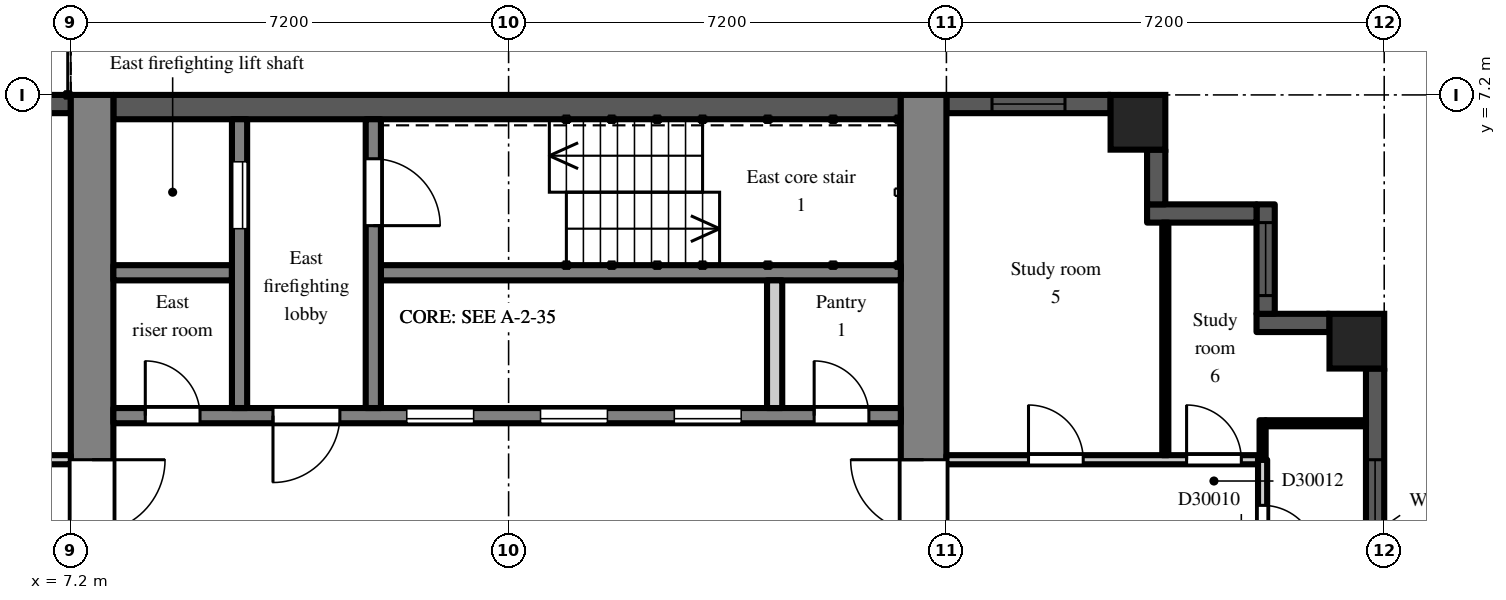
"""IFC4 building model, lengths in metres.
Left out: names, types, materials, properties, quantities, classifications, styles, units other than length and angle.
Written with IfcOpenShell. Run it as: python <this file> out.ifc"""

import sys

from ifc_helpers import new_model, si_unit, direction, frame, frame_2d, origin, origin_2d, place, context, subcontext, project, spatial, rectangle, extrude, element, fill, save


model = new_model("IFC4")
c1 = context("Model", 3, precision=1e-05, world=origin(), true_north=direction((0.0, 1.0)))
c2 = subcontext(c1, "Body", "Model", "MODEL_VIEW")
j1 = project(units=[si_unit("LENGTHUNIT", "METRE"), si_unit("PLANEANGLEUNIT", "RADIAN")], contexts=[c1])
p1 = place(None, origin())
s1 = spatial("IfcSite", under=j1, at=p1, CompositionType="ELEMENT")
p2 = place(p1, origin())
s2 = spatial("IfcBuilding", under=s1, at=p2, CompositionType="ELEMENT")
p3 = place(p2, frame((0.0, 0.0, 207.9)))
s3 = spatial("IfcBuildingStorey", under=s2, at=p3, CompositionType="ELEMENT", Elevation=207.9)
for number, where, z_axis, x_axis in (
    (1, (24.75, 6.75, 0.0), (0.0, 0.0, 1.0), (1.0, 0.0, 0.0)),
    (2, (28.35, 3.15, 0.0), (0.0, 0.0, 1.0), (1.0, 0.0, 0.0)),
):
    element("IfcColumn", number, at=place(p3, frame(where, z_axis=z_axis, x_axis=x_axis)), inside=s3, PredefinedType="COLUMN", context=c2, shape_type="SweptSolid", body=[
        extrude(rectangle(XDim=0.9, YDim=0.9, at=origin_2d()), origin(), (0.0, 0.0, 1.0), 3.0),
    ])
p4 = place(p3, frame((28.65, -2.7, 0.0), z_axis=(0.0, 0.0, 1.0), x_axis=(0.0, 1.0, 0.0)))
e3 = element("IfcWall", 3, at=p4, inside=s3, PredefinedType="SOLIDWALL", context=c2, shape_type="SweptSolid", body=[
    extrude(rectangle(XDim=5.4, YDim=0.3, at=frame_2d((2.7, 0.0))), origin(), (0.0, 0.0, 1.0), 2.3),
])
p5 = place(p4, frame((1.5, 0.0, 0.2)))
e4 = element("IfcOpeningElement", 4, at=p5, cuts=e3, PredefinedType="OPENING", context=c2, shape_type="SweptSolid", body=[
    extrude(rectangle(XDim=2.4, YDim=1.85, at=frame_2d((1.2, 0.925))), frame((0.0, 0.16, 0.0), z_axis=(0.0, -1.0, 0.0), x_axis=(1.0, 0.0, 0.0)), (0.0, 0.0, 1.0), 0.32),
])
p6 = place(p3, frame((27.9, 3.45, 0.0), z_axis=(0.0, 0.0, 1.0), x_axis=(-1.0, 0.0, 0.0)))
e5 = element("IfcWall", 5, at=p6, inside=s3, PredefinedType="SOLIDWALL", context=c2, shape_type="SweptSolid", body=[
    extrude(rectangle(XDim=1.2, YDim=0.3, at=frame_2d((0.6, 0.0))), origin(), (0.0, 0.0, 1.0), 2.6),
])
p7 = place(p3, frame((26.85, 3.6, 0.0), z_axis=(0.0, 0.0, 1.0), x_axis=(0.0, 1.0, 0.0)))
e6 = element("IfcWall", 6, at=p7, inside=s3, PredefinedType="SOLIDWALL", context=c2, shape_type="SweptSolid", body=[
    extrude(rectangle(XDim=1.8, YDim=0.3, at=frame_2d((0.9, 0.0))), origin(), (0.0, 0.0, 1.0), 2.6),
])
p8 = place(p7, frame((0.3, 0.0, 0.2)))
e7 = element("IfcOpeningElement", 7, at=p8, cuts=e6, PredefinedType="OPENING", context=c2, shape_type="SweptSolid", body=[
    extrude(rectangle(XDim=1.2, YDim=1.85, at=frame_2d((0.6, 0.925))), frame((0.0, 0.16, 0.0), z_axis=(0.0, -1.0, 0.0), x_axis=(1.0, 0.0, 0.0)), (0.0, 0.0, 1.0), 0.32),
])
p9 = place(p3, frame((26.7, 5.25, 0.0), z_axis=(0.0, 0.0, 1.0), x_axis=(-1.0, 0.0, 0.0)))
e8 = element("IfcWall", 8, at=p9, inside=s3, PredefinedType="SOLIDWALL", context=c2, shape_type="SweptSolid", body=[
    extrude(rectangle(XDim=1.8, YDim=0.3, at=frame_2d((0.9, 0.0))), origin(), (0.0, 0.0, 1.0), 2.6),
])
p10 = place(p3, frame((25.05, 5.4, 0.0), z_axis=(0.0, 0.0, 1.0), x_axis=(0.0, 1.0, 0.0)))
e9 = element("IfcWall", 9, at=p10, inside=s3, PredefinedType="SOLIDWALL", context=c2, shape_type="SweptSolid", body=[
    extrude(rectangle(XDim=0.9, YDim=0.3, at=frame_2d((0.45, 0.0))), origin(), (0.0, 0.0, 1.0), 2.6),
])
p11 = place(p3, frame((24.3, 7.05, 0.0), z_axis=(0.0, 0.0, 1.0), x_axis=(-1.0, 0.0, 0.0)))
e10 = element("IfcWall", 10, at=p11, inside=s3, PredefinedType="SOLIDWALL", context=c2, shape_type="SweptSolid", body=[
    extrude(rectangle(XDim=2.7, YDim=0.3, at=frame_2d((1.35, 0.0))), origin(), (0.0, 0.0, 1.0), 2.3),
])
p12 = place(p11, frame((0.75, 0.0, 0.2)))
e11 = element("IfcOpeningElement", 11, at=p12, cuts=e10, PredefinedType="OPENING", context=c2, shape_type="SweptSolid", body=[
    extrude(rectangle(XDim=1.2, YDim=1.85, at=frame_2d((0.6, 0.925))), frame((0.0, 0.16, 0.0), z_axis=(0.0, -1.0, 0.0), x_axis=(1.0, 0.0, 0.0)), (0.0, 0.0, 1.0), 0.32),
])
p13 = place(p3, frame((7.2, 7.05, 0.0), z_axis=(0.0, 0.0, 1.0), x_axis=(-1.0, 0.0, 0.0)))
e12 = element("IfcWall", 12, at=p13, inside=s3, PredefinedType="SOLIDWALL", context=c2, shape_type="SweptSolid", body=[
    extrude(rectangle(XDim=3.0, YDim=0.3, at=frame_2d((1.5, 0.0))), origin(), (0.0, 0.0, 1.0), 2.3),
])
p14 = place(p3, frame((7.55, -7.2, 0.0), z_axis=(0.0, 0.0, 1.0), x_axis=(0.0, 1.0, 0.0)))
e13 = element("IfcWall", 13, at=p14, inside=s3, PredefinedType="SHEAR", context=c2, shape_type="SweptSolid", body=[
    extrude(rectangle(XDim=14.4, YDim=0.7, at=frame_2d((7.2, 0.0))), origin(), (0.0, 0.0, 1.0), 2.6),
])
p15 = place(p14, frame((6.0, 0.0, 0.0)))
e14 = element("IfcOpeningElement", 14, at=p15, cuts=e13, PredefinedType="OPENING", context=c2, shape_type="SweptSolid", body=[
    extrude(rectangle(XDim=2.4, YDim=2.2, at=frame_2d((1.2, 1.1))), frame((0.0, 0.36, 0.0), z_axis=(0.0, -1.0, 0.0), x_axis=(1.0, 0.0, 0.0)), (0.0, 0.0, 1.0), 0.72),
])
p16 = place(p3, frame((21.225, -7.2, 0.0), z_axis=(0.0, 0.0, 1.0), x_axis=(0.0, 1.0, 0.0)))
e15 = element("IfcWall", 15, at=p16, inside=s3, PredefinedType="SHEAR", context=c2, shape_type="SweptSolid", body=[
    extrude(rectangle(XDim=14.4, YDim=0.75, at=frame_2d((7.2, 0.0))), origin(), (0.0, 0.0, 1.0), 2.6),
])
p17 = place(p16, frame((6.0, 0.0, 0.0)))
e16 = element("IfcOpeningElement", 16, at=p17, cuts=e15, PredefinedType="OPENING", context=c2, shape_type="SweptSolid", body=[
    extrude(rectangle(XDim=2.4, YDim=2.2, at=frame_2d((1.2, 1.1))), frame((0.0, 0.385, 0.0), z_axis=(0.0, -1.0, 0.0), x_axis=(1.0, 0.0, 0.0)), (0.0, 0.0, 1.0), 0.77),
])
p18 = place(p3, frame((7.9, 7.0, 0.0), z_axis=(0.0, 0.0, 1.0), x_axis=(1.0, 0.0, 0.0)))
e17 = element("IfcWall", 17, at=p18, inside=s3, PredefinedType="SHEAR", context=c2, shape_type="SweptSolid", body=[
    extrude(rectangle(XDim=12.95, YDim=0.4, at=frame_2d((6.475, 0.0))), origin(), (0.0, 0.0, 1.0), 2.6),
])
p19 = place(p3, frame((7.9, 1.925, 0.0), z_axis=(0.0, 0.0, 1.0), x_axis=(1.0, 0.0, 0.0)))
e18 = element("IfcWall", 18, at=p19, inside=s3, PredefinedType="SHEAR", context=c2, shape_type="SweptSolid", body=[
    extrude(rectangle(XDim=12.95, YDim=0.25, at=frame_2d((6.475, 0.0))), origin(), (0.0, 0.0, 1.0), 2.6),
])
p20 = place(p19, frame((4.825, 0.0, 0.0)))
e19 = element("IfcOpeningElement", 19, at=p20, cuts=e18, PredefinedType="OPENING", context=c2, shape_type="SweptSolid", body=[
    extrude(rectangle(XDim=1.1, YDim=2.1, at=frame_2d((0.55, 1.05))), frame((0.0, 0.135, 0.0), z_axis=(0.0, -1.0, 0.0), x_axis=(1.0, 0.0, 0.0)), (0.0, 0.0, 1.0), 0.27),
])
p21 = place(p19, frame((7.025, 0.0, 0.0)))
e20 = element("IfcOpeningElement", 20, at=p21, cuts=e18, PredefinedType="OPENING", context=c2, shape_type="SweptSolid", body=[
    extrude(rectangle(XDim=1.1, YDim=2.1, at=frame_2d((0.55, 1.05))), frame((0.0, 0.135, 0.0), z_axis=(0.0, -1.0, 0.0), x_axis=(1.0, 0.0, 0.0)), (0.0, 0.0, 1.0), 0.27),
])
p22 = place(p19, frame((9.225, 0.0, 0.0)))
e21 = element("IfcOpeningElement", 21, at=p22, cuts=e18, PredefinedType="OPENING", context=c2, shape_type="SweptSolid", body=[
    extrude(rectangle(XDim=1.1, YDim=2.1, at=frame_2d((0.55, 1.05))), frame((0.0, 0.135, 0.0), z_axis=(0.0, -1.0, 0.0), x_axis=(1.0, 0.0, 0.0)), (0.0, 0.0, 1.0), 0.27),
])
p23 = place(p19, frame((0.525, 0.0, 0.0)))
e22 = element("IfcOpeningElement", 22, at=p23, cuts=e18, PredefinedType="OPENING", context=c2, shape_type="SweptSolid", body=[
    extrude(rectangle(XDim=0.9, YDim=2.1, at=frame_2d((0.45, 1.05))), frame((0.0, 0.135, 0.0), z_axis=(0.0, -1.0, 0.0), x_axis=(1.0, 0.0, 0.0)), (0.0, 0.0, 1.0), 0.27),
])
p24 = place(p19, frame((2.625, 0.0, 0.0)))
e23 = element("IfcOpeningElement", 23, at=p24, cuts=e18, PredefinedType="OPENING", context=c2, shape_type="SweptSolid", body=[
    extrude(rectangle(XDim=1.1, YDim=2.1, at=frame_2d((0.55, 1.05))), frame((0.0, 0.135, 0.0), z_axis=(0.0, -1.0, 0.0), x_axis=(1.0, 0.0, 0.0)), (0.0, 0.0, 1.0), 0.27),
])
p25 = place(p19, frame((11.525, 0.0, 0.0)))
e24 = element("IfcOpeningElement", 24, at=p25, cuts=e18, PredefinedType="OPENING", context=c2, shape_type="SweptSolid", body=[
    extrude(rectangle(XDim=0.9, YDim=2.1, at=frame_2d((0.45, 1.05))), frame((0.0, 0.135, 0.0), z_axis=(0.0, -1.0, 0.0), x_axis=(1.0, 0.0, 0.0)), (0.0, 0.0, 1.0), 0.27),
])
p26 = place(p3, frame((7.9, 4.275, 0.0), z_axis=(0.0, 0.0, 1.0), x_axis=(1.0, 0.0, 0.0)))
e25 = element("IfcWall", 25, at=p26, inside=s3, PredefinedType="SHEAR", context=c2, shape_type="SweptSolid", body=[
    extrude(rectangle(XDim=1.95, YDim=0.25, at=frame_2d((0.975, 0.0))), origin(), (0.0, 0.0, 1.0), 2.6),
])
p27 = place(p3, frame((12.3, 4.275, 0.0), z_axis=(0.0, 0.0, 1.0), x_axis=(1.0, 0.0, 0.0)))
e26 = element("IfcWall", 26, at=p27, inside=s3, PredefinedType="SHEAR", context=c2, shape_type="SweptSolid", body=[
    extrude(rectangle(XDim=8.55, YDim=0.25, at=frame_2d((4.275, 0.0))), origin(), (0.0, 0.0, 1.0), 2.6),
])
p28 = place(p3, frame((9.975, 2.05, 0.0), z_axis=(0.0, 0.0, 1.0), x_axis=(0.0, 1.0, 0.0)))
e27 = element("IfcWall", 27, at=p28, inside=s3, PredefinedType="SHEAR", context=c2, shape_type="SweptSolid", body=[
    extrude(rectangle(XDim=4.75, YDim=0.25, at=frame_2d((2.375, 0.0))), origin(), (0.0, 0.0, 1.0), 2.6),
])
p29 = place(p28, frame((2.95, 0.0, 0.0)))
e28 = element("IfcOpeningElement", 28, at=p29, cuts=e27, PredefinedType="OPENING", context=c2, shape_type="SweptSolid", body=[
    extrude(rectangle(XDim=1.1, YDim=2.1, at=frame_2d((0.55, 1.05))), frame((0.0, 0.135, 0.0), z_axis=(0.0, -1.0, 0.0), x_axis=(1.0, 0.0, 0.0)), (0.0, 0.0, 1.0), 0.27),
])
p30 = place(p3, frame((12.175, 2.05, 0.0), z_axis=(0.0, 0.0, 1.0), x_axis=(0.0, 1.0, 0.0)))
e29 = element("IfcWall", 29, at=p30, inside=s3, PredefinedType="SHEAR", context=c2, shape_type="SweptSolid", body=[
    extrude(rectangle(XDim=4.75, YDim=0.25, at=frame_2d((2.375, 0.0))), origin(), (0.0, 0.0, 1.0), 2.6),
])
p31 = place(p30, frame((3.0, 0.0, 0.0)))
e30 = element("IfcOpeningElement", 30, at=p31, cuts=e29, PredefinedType="OPENING", context=c2, shape_type="SweptSolid", body=[
    extrude(rectangle(XDim=1.1, YDim=2.1, at=frame_2d((0.55, 1.05))), frame((0.0, 0.135, 0.0), z_axis=(0.0, -1.0, 0.0), x_axis=(1.0, 0.0, 0.0)), (0.0, 0.0, 1.0), 0.27),
])
p32 = place(p3, frame((18.775, 2.05, 0.0), z_axis=(0.0, 0.0, 1.0), x_axis=(0.0, 1.0, 0.0)))
e31 = element("IfcWall", 31, at=p32, inside=s3, PredefinedType="PARTITIONING", context=c2, shape_type="SweptSolid", body=[
    extrude(rectangle(XDim=2.1, YDim=0.25, at=frame_2d((1.05, 0.0))), origin(), (0.0, 0.0, 1.0), 2.6),
])
p33 = place(p3, frame((1.275, 1.2, 0.0), z_axis=(0.0, 0.0, 1.0), x_axis=(1.0, 0.0, 0.0)))
e32 = element("IfcWall", 32, at=p33, inside=s3, PredefinedType="PARTITIONING", context=c2, shape_type="SweptSolid", body=[
    extrude(rectangle(XDim=5.925, YDim=0.15, at=frame_2d((2.962, 0.0))), origin(), (0.0, 0.0, 1.0), 2.6),
])
p34 = place(p33, frame((3.475, 0.0, 0.0)))
e33 = element("IfcOpeningElement", 33, at=p34, cuts=e32, PredefinedType="OPENING", context=c2, shape_type="SweptSolid", body=[
    extrude(rectangle(XDim=0.9, YDim=2.1, at=frame_2d((0.45, 1.05))), frame((0.0, 0.085, 0.0), z_axis=(0.0, -1.0, 0.0), x_axis=(1.0, 0.0, 0.0)), (0.0, 0.0, 1.0), 0.17),
])
p35 = place(p3, frame((21.6, 1.2, 0.0), z_axis=(0.0, 0.0, 1.0), x_axis=(1.0, 0.0, 0.0)))
e34 = element("IfcWall", 34, at=p35, inside=s3, PredefinedType="PARTITIONING", context=c2, shape_type="SweptSolid", body=[
    extrude(rectangle(XDim=5.125, YDim=0.15, at=frame_2d((2.562, 0.0))), origin(), (0.0, 0.0, 1.0), 2.6),
])
p36 = place(p35, frame((1.35, 0.0, 0.0)))
e35 = element("IfcOpeningElement", 35, at=p36, cuts=e34, PredefinedType="OPENING", context=c2, shape_type="SweptSolid", body=[
    extrude(rectangle(XDim=0.9, YDim=2.1, at=frame_2d((0.45, 1.05))), frame((0.0, 0.085, 0.0), z_axis=(0.0, -1.0, 0.0), x_axis=(1.0, 0.0, 0.0)), (0.0, 0.0, 1.0), 0.17),
])
p37 = place(p35, frame((3.95, 0.0, 0.0)))
e36 = element("IfcOpeningElement", 36, at=p37, cuts=e34, PredefinedType="OPENING", context=c2, shape_type="SweptSolid", body=[
    extrude(rectangle(XDim=0.9, YDim=2.1, at=frame_2d((0.45, 1.05))), frame((0.0, 0.085, 0.0), z_axis=(0.0, -1.0, 0.0), x_axis=(1.0, 0.0, 0.0)), (0.0, 0.0, 1.0), 0.17),
])
p38 = place(p3, frame((25.2, 1.275, 0.0), z_axis=(0.0, 0.0, 1.0), x_axis=(0.0, 1.0, 0.0)))
e37 = element("IfcWall", 37, at=p38, inside=s3, PredefinedType="PARTITIONING", context=c2, shape_type="SweptSolid", body=[
    extrude(rectangle(XDim=3.825, YDim=0.1, at=frame_2d((1.913, 0.0))), origin(), (0.0, 0.0, 1.0), 2.6),
])
p39 = place(p3, frame((26.8, -1.2, 0.0), z_axis=(0.0, 0.0, 1.0), x_axis=(0.0, 1.0, 0.0)))
e38 = element("IfcWall", 38, at=p39, inside=s3, PredefinedType="PARTITIONING", context=c2, shape_type="SweptSolid", body=[
    extrude(rectangle(XDim=2.4, YDim=0.15, at=frame_2d((1.2, 0.0))), origin(), (0.0, 0.0, 1.0), 2.6),
])
p40 = place(p39, frame((0.75, 0.0, 0.0)))
e39 = element("IfcOpeningElement", 39, at=p40, cuts=e38, PredefinedType="OPENING", context=c2, shape_type="SweptSolid", body=[
    extrude(rectangle(XDim=0.9, YDim=2.1, at=frame_2d((0.45, 1.05))), frame((0.0, 0.085, 0.0), z_axis=(0.0, -1.0, 0.0), x_axis=(1.0, 0.0, 0.0)), (0.0, 0.0, 1.0), 0.17),
])
p41 = place(p3, frame((26.8, 1.2, 0.0), z_axis=(0.0, 0.0, 1.0), x_axis=(0.0, 1.0, 0.0)))
e40 = element("IfcWall", 40, at=p41, inside=s3, PredefinedType="PARTITIONING", context=c2, shape_type="SweptSolid", body=[
    extrude(rectangle(XDim=0.65, YDim=0.1, at=frame_2d((0.325, 0.0))), origin(), (0.0, 0.0, 1.0), 2.6),
])
p42 = place(p3, frame((26.85, 1.8, 0.0), z_axis=(0.0, 0.0, 1.0), x_axis=(1.0, 0.0, 0.0)))
e41 = element("IfcWall", 41, at=p42, inside=s3, PredefinedType="PARTITIONING", context=c2, shape_type="SweptSolid", body=[
    extrude(rectangle(XDim=1.65, YDim=0.1, at=frame_2d((0.825, 0.0))), origin(), (0.0, 0.0, 1.0), 2.6),
])
p43 = place(p5, origin())
e42 = element("IfcWindow", 42, at=p43, inside=s3, PartitioningType="SINGLE_PANEL", PredefinedType="WINDOW", context=c2, shape_type="SweptSolid", body=[
    extrude(rectangle(XDim=2.4, YDim=1.85, at=frame_2d((1.2, 0.925))), frame((0.0, 0.03, 0.0), z_axis=(0.0, -1.0, 0.0), x_axis=(1.0, 0.0, 0.0)), (0.0, 0.0, 1.0), 0.06),
])
fill(e4, e42)
p44 = place(p8, origin())
e43 = element("IfcWindow", 43, at=p44, inside=s3, PartitioningType="SINGLE_PANEL", PredefinedType="WINDOW", context=c2, shape_type="SweptSolid", body=[
    extrude(rectangle(XDim=1.2, YDim=1.85, at=frame_2d((0.6, 0.925))), frame((0.0, 0.03, 0.0), z_axis=(0.0, -1.0, 0.0), x_axis=(1.0, 0.0, 0.0)), (0.0, 0.0, 1.0), 0.06),
])
fill(e7, e43)
p45 = place(p12, origin())
e44 = element("IfcWindow", 44, at=p45, inside=s3, PartitioningType="SINGLE_PANEL", PredefinedType="WINDOW", context=c2, shape_type="SweptSolid", body=[
    extrude(rectangle(XDim=1.2, YDim=1.85, at=frame_2d((0.6, 0.925))), frame((0.0, 0.03, 0.0), z_axis=(0.0, -1.0, 0.0), x_axis=(1.0, 0.0, 0.0)), (0.0, 0.0, 1.0), 0.06),
])
fill(e11, e44)
p46 = place(p20, origin())
e45 = element("IfcDoor", 45, at=p46, inside=s3, OperationType="SLIDING_TO_LEFT", PredefinedType="DOOR", context=c2, shape_type="SweptSolid", body=[
    extrude(rectangle(XDim=1.1, YDim=2.1, at=frame_2d((0.55, 1.05))), frame((0.0, 0.025, 0.0), z_axis=(0.0, -1.0, 0.0), x_axis=(1.0, 0.0, 0.0)), (0.0, 0.0, 1.0), 0.05),
])
fill(e19, e45)
p47 = place(p21, origin())
e46 = element("IfcDoor", 46, at=p47, inside=s3, OperationType="SLIDING_TO_LEFT", PredefinedType="DOOR", context=c2, shape_type="SweptSolid", body=[
    extrude(rectangle(XDim=1.1, YDim=2.1, at=frame_2d((0.55, 1.05))), frame((0.0, 0.025, 0.0), z_axis=(0.0, -1.0, 0.0), x_axis=(1.0, 0.0, 0.0)), (0.0, 0.0, 1.0), 0.05),
])
fill(e20, e46)
p48 = place(p22, origin())
e47 = element("IfcDoor", 47, at=p48, inside=s3, OperationType="SLIDING_TO_LEFT", PredefinedType="DOOR", context=c2, shape_type="SweptSolid", body=[
    extrude(rectangle(XDim=1.1, YDim=2.1, at=frame_2d((0.55, 1.05))), frame((0.0, 0.025, 0.0), z_axis=(0.0, -1.0, 0.0), x_axis=(1.0, 0.0, 0.0)), (0.0, 0.0, 1.0), 0.05),
])
fill(e21, e47)
p49 = place(p29, origin())
e48 = element("IfcDoor", 48, at=p49, inside=s3, OperationType="SLIDING_TO_LEFT", PredefinedType="DOOR", context=c2, shape_type="SweptSolid", body=[
    extrude(rectangle(XDim=1.1, YDim=2.1, at=frame_2d((0.55, 1.05))), frame((0.0, 0.025, 0.0), z_axis=(0.0, -1.0, 0.0), x_axis=(1.0, 0.0, 0.0)), (0.0, 0.0, 1.0), 0.05),
])
fill(e28, e48)
p50 = place(p31, frame((1.1, 0.0, 0.0), z_axis=(0.0, 0.0, 1.0), x_axis=(-1.0, 0.0, 0.0)))
e49 = element("IfcDoor", 49, at=p50, inside=s3, OperationType="SINGLE_SWING_RIGHT", PredefinedType="DOOR", context=c2, shape_type="SweptSolid", body=[
    extrude(rectangle(XDim=1.1, YDim=2.1, at=frame_2d((0.55, 1.05))), frame((0.0, 0.025, 0.0), z_axis=(0.0, -1.0, 0.0), x_axis=(1.0, 0.0, 0.0)), (0.0, 0.0, 1.0), 0.05),
])
fill(e30, e49)
p51 = place(p23, origin())
e50 = element("IfcDoor", 50, at=p51, inside=s3, OperationType="SINGLE_SWING_LEFT", PredefinedType="DOOR", context=c2, shape_type="SweptSolid", body=[
    extrude(rectangle(XDim=0.9, YDim=2.1, at=frame_2d((0.45, 1.05))), frame((0.0, 0.025, 0.0), z_axis=(0.0, -1.0, 0.0), x_axis=(1.0, 0.0, 0.0)), (0.0, 0.0, 1.0), 0.05),
])
fill(e22, e50)
p52 = place(p24, frame((1.1, 0.0, 0.0), z_axis=(0.0, 0.0, 1.0), x_axis=(-1.0, 0.0, 0.0)))
e51 = element("IfcDoor", 51, at=p52, inside=s3, OperationType="SINGLE_SWING_RIGHT", PredefinedType="DOOR", context=c2, shape_type="SweptSolid", body=[
    extrude(rectangle(XDim=1.1, YDim=2.1, at=frame_2d((0.55, 1.05))), frame((0.0, 0.025, 0.0), z_axis=(0.0, -1.0, 0.0), x_axis=(1.0, 0.0, 0.0)), (0.0, 0.0, 1.0), 0.05),
])
fill(e23, e51)
p53 = place(p15, frame((2.4, 0.0, 0.0), z_axis=(0.0, 0.0, 1.0), x_axis=(-1.0, 0.0, 0.0)))
e52 = element("IfcDoor", 52, at=p53, inside=s3, OperationType="DOUBLE_DOOR_DOUBLE_SWING", PredefinedType="DOOR", context=c2, shape_type="SweptSolid", body=[
    extrude(rectangle(XDim=2.4, YDim=2.2, at=frame_2d((1.2, 1.1))), frame((0.0, 0.025, 0.0), z_axis=(0.0, -1.0, 0.0), x_axis=(1.0, 0.0, 0.0)), (0.0, 0.0, 1.0), 0.05),
])
fill(e14, e52)
p54 = place(p17, origin())
e53 = element("IfcDoor", 53, at=p54, inside=s3, OperationType="DOUBLE_DOOR_DOUBLE_SWING", PredefinedType="DOOR", context=c2, shape_type="SweptSolid", body=[
    extrude(rectangle(XDim=2.4, YDim=2.2, at=frame_2d((1.2, 1.1))), frame((0.0, 0.025, 0.0), z_axis=(0.0, -1.0, 0.0), x_axis=(1.0, 0.0, 0.0)), (0.0, 0.0, 1.0), 0.05),
])
fill(e16, e53)
p55 = place(p25, origin())
e54 = element("IfcDoor", 54, at=p55, inside=s3, OperationType="SINGLE_SWING_LEFT", PredefinedType="DOOR", context=c2, shape_type="SweptSolid", body=[
    extrude(rectangle(XDim=0.9, YDim=2.1, at=frame_2d((0.45, 1.05))), frame((0.0, 0.025, 0.0), z_axis=(0.0, -1.0, 0.0), x_axis=(1.0, 0.0, 0.0)), (0.0, 0.0, 1.0), 0.05),
])
fill(e24, e54)
p56 = place(p40, frame((0.9, 0.0, 0.0), z_axis=(0.0, 0.0, 1.0), x_axis=(-1.0, 0.0, 0.0)))
e55 = element("IfcDoor", 55, at=p56, inside=s3, OperationType="SINGLE_SWING_RIGHT", PredefinedType="DOOR", context=c2, shape_type="SweptSolid", body=[
    extrude(rectangle(XDim=0.9, YDim=2.1, at=frame_2d((0.45, 1.05))), frame((0.0, 0.025, 0.0), z_axis=(0.0, -1.0, 0.0), x_axis=(1.0, 0.0, 0.0)), (0.0, 0.0, 1.0), 0.05),
])
fill(e39, e55)
p57 = place(p36, origin())
e56 = element("IfcDoor", 56, at=p57, inside=s3, OperationType="SINGLE_SWING_LEFT", PredefinedType="DOOR", context=c2, shape_type="SweptSolid", body=[
    extrude(rectangle(XDim=0.9, YDim=2.1, at=frame_2d((0.45, 1.05))), frame((0.0, 0.025, 0.0), z_axis=(0.0, -1.0, 0.0), x_axis=(1.0, 0.0, 0.0)), (0.0, 0.0, 1.0), 0.05),
])
fill(e35, e56)
p58 = place(p37, origin())
e57 = element("IfcDoor", 57, at=p58, inside=s3, OperationType="SINGLE_SWING_LEFT", PredefinedType="DOOR", context=c2, shape_type="SweptSolid", body=[
    extrude(rectangle(XDim=0.9, YDim=2.1, at=frame_2d((0.45, 1.05))), frame((0.0, 0.025, 0.0), z_axis=(0.0, -1.0, 0.0), x_axis=(1.0, 0.0, 0.0)), (0.0, 0.0, 1.0), 0.05),
])
fill(e36, e57)
save(model, sys.argv[1])
